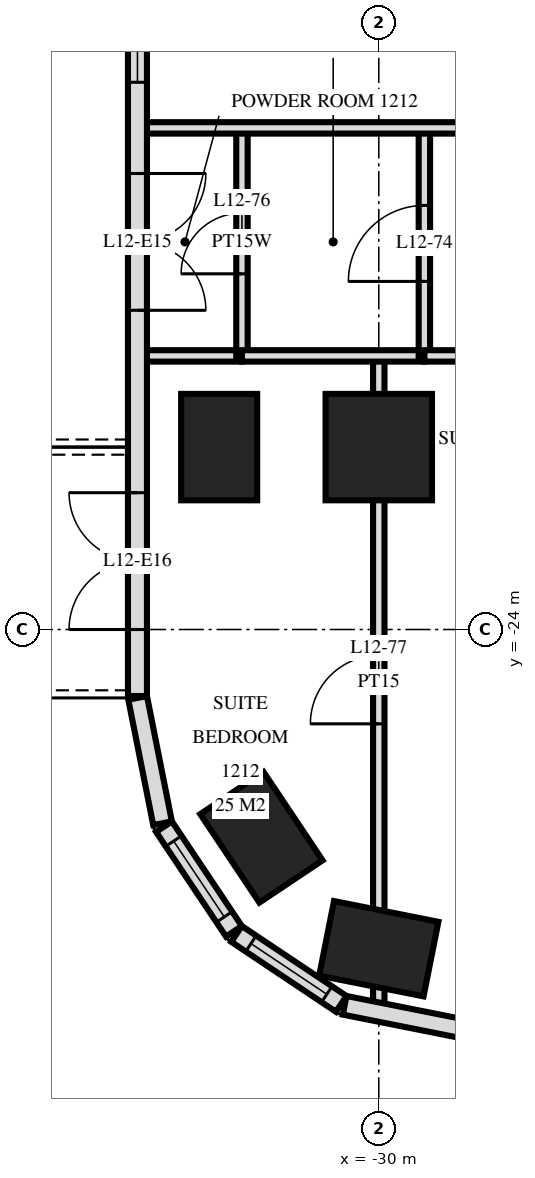
"""IFC4 building model, lengths in metres.
Left out: names, types, materials, properties, quantities, classifications, styles, units other than length and angle.
Written with IfcOpenShell. Run it as: python <this file> out.ifc"""

import sys

from ifc_helpers import new_model, si_unit, direction, frame, frame_2d, origin, origin_2d, place, context, subcontext, project, spatial, rectangle, extrude, element, fill, save


model = new_model("IFC4")
c1 = context("Model", 3, precision=1e-05, world=origin(), true_north=direction((0.0, 1.0)))
c2 = subcontext(c1, "Body", "Model", "MODEL_VIEW")
j1 = project(units=[si_unit("LENGTHUNIT", "METRE"), si_unit("PLANEANGLEUNIT", "RADIAN")], contexts=[c1])
p1 = place(None, origin())
s1 = spatial("IfcSite", under=j1, at=p1, CompositionType="ELEMENT")
p2 = place(p1, origin())
s2 = spatial("IfcBuilding", under=s1, at=p2, CompositionType="ELEMENT")
p3 = place(p2, frame((0.0, 0.0, 52.8)))
s3 = spatial("IfcBuildingStorey", under=s2, at=p3, CompositionType="ELEMENT", Elevation=52.8)
for number, where, z_axis, x_axis in (
    (1, (-32.1, -21.6, 0.0), (0.0, 0.0, 1.0), (0.0, 1.0, 0.0)),
    (2, (-31.544, -26.733, 0.0), (0.0, 0.0, 1.0), (-0.556, 0.831, 0.0)),
    (3, (-30.0, -28.2, 0.0), (0.0, 0.0, 1.0), (-0.981, 0.195, 0.0)),
):
    element("IfcColumn", number, at=place(p3, frame(where, z_axis=z_axis, x_axis=x_axis)), inside=s3, PredefinedType="COLUMN", context=c2, shape_type="SweptSolid", body=[
        extrude(rectangle(XDim=1.4, YDim=1.0, at=origin_2d()), origin(), (0.0, 0.0, 1.0), 3.6),
    ])
p4 = place(p3, frame((-30.0, -21.6, 0.0), z_axis=(0.0, 0.0, 1.0), x_axis=(1.0, 0.0, 0.0)))
e4 = element("IfcColumn", 4, at=p4, inside=s3, PredefinedType="COLUMN", context=c2, shape_type="SweptSolid", body=[
    extrude(rectangle(XDim=1.4, YDim=1.4, at=origin_2d()), origin(), (0.0, 0.0, 1.0), 3.6),
])
p5 = place(p3, frame((-33.175, -3.325, 0.0), z_axis=(0.0, 0.0, 1.0), x_axis=(0.0, -1.0, 0.0)))
e5 = element("IfcWall", 5, at=p5, inside=s3, PredefinedType="SOLIDWALL", context=c2, shape_type="SweptSolid", body=[
    extrude(rectangle(XDim=21.551, YDim=0.25, at=frame_2d((10.775, 0.0))), origin(), (0.0, 0.0, 1.0), 3.32),
])
p6 = place(p5, frame((6.65, 0.0, 0.0)))
e6 = element("IfcOpeningElement", 6, at=p6, cuts=e5, PredefinedType="OPENING", context=c2, shape_type="SweptSolid", body=[
    extrude(rectangle(XDim=1.8, YDim=2.4, at=frame_2d((0.9, 1.2))), frame((0.0, 0.135, 0.0), z_axis=(0.0, -1.0, 0.0), x_axis=(1.0, 0.0, 0.0)), (0.0, 0.0, 1.0), 0.27),
])
p7 = place(p5, frame((12.275, 0.0, 0.3)))
e7 = element("IfcOpeningElement", 7, at=p7, cuts=e5, PredefinedType="OPENING", context=c2, shape_type="SweptSolid", body=[
    extrude(rectangle(XDim=1.2, YDim=2.1, at=frame_2d((0.6, 1.05))), frame((0.0, 0.135, 0.0), z_axis=(0.0, -1.0, 0.0), x_axis=(1.0, 0.0, 0.0)), (0.0, 0.0, 1.0), 0.27),
])
p8 = place(p5, frame((14.675, 0.0, 0.0)))
e8 = element("IfcOpeningElement", 8, at=p8, cuts=e5, PredefinedType="OPENING", context=c2, shape_type="SweptSolid", body=[
    extrude(rectangle(XDim=1.8, YDim=2.4, at=frame_2d((0.9, 1.2))), frame((0.0, 0.135, 0.0), z_axis=(0.0, -1.0, 0.0), x_axis=(1.0, 0.0, 0.0)), (0.0, 0.0, 1.0), 0.27),
])
p9 = place(p5, frame((18.875, 0.0, 0.0)))
e9 = element("IfcOpeningElement", 9, at=p9, cuts=e5, PredefinedType="OPENING", context=c2, shape_type="SweptSolid", body=[
    extrude(rectangle(XDim=1.8, YDim=2.4, at=frame_2d((0.9, 1.2))), frame((0.0, 0.135, 0.0), z_axis=(0.0, -1.0, 0.0), x_axis=(1.0, 0.0, 0.0)), (0.0, 0.0, 1.0), 0.27),
])
p10 = place(p3, frame((-33.173, -24.9, 0.0), z_axis=(0.0, 0.0, 1.0), x_axis=(0.195166572128, -0.980770110232, 0.0)))
e10 = element("IfcWall", 10, at=p10, inside=s3, PredefinedType="SOLIDWALL", context=c2, shape_type="SweptSolid", body=[
    extrude(rectangle(XDim=1.681, YDim=0.25, at=frame_2d((0.841, 0.0))), origin(), (0.0, 0.0, 1.0), 3.32),
])
p11 = place(p3, frame((-32.826, -26.594, 0.0), z_axis=(0.0, 0.0, 1.0), x_axis=(0.55555029066, -0.831482937015, 0.0)))
e11 = element("IfcWall", 11, at=p11, inside=s3, PredefinedType="SOLIDWALL", context=c2, shape_type="SweptSolid", body=[
    extrude(rectangle(XDim=1.656, YDim=0.25, at=frame_2d((0.828, 0.0))), origin(), (0.0, 0.0, 1.0), 3.32),
])
p12 = place(p11, frame((0.228, 0.0, 0.9)))
e12 = element("IfcOpeningElement", 12, at=p12, cuts=e11, PredefinedType="OPENING", context=c2, shape_type="SweptSolid", body=[
    extrude(rectangle(XDim=1.2, YDim=1.5, at=frame_2d((0.6, 0.75))), frame((0.0, 0.135, 0.0), z_axis=(0.0, -1.0, 0.0), x_axis=(1.0, 0.0, 0.0)), (0.0, 0.0, 1.0), 0.27),
])
p13 = place(p3, frame((-31.871, -28.006, 0.0), z_axis=(0.0, 0.0, 1.0), x_axis=(0.831482937015, -0.55555029066, 0.0)))
e13 = element("IfcWall", 13, at=p13, inside=s3, PredefinedType="SOLIDWALL", context=c2, shape_type="SweptSolid", body=[
    extrude(rectangle(XDim=1.656, YDim=0.25, at=frame_2d((0.828, 0.0))), origin(), (0.0, 0.0, 1.0), 3.32),
])
p14 = place(p13, frame((0.228, 0.0, 0.9)))
e14 = element("IfcOpeningElement", 14, at=p14, cuts=e13, PredefinedType="OPENING", context=c2, shape_type="SweptSolid", body=[
    extrude(rectangle(XDim=1.2, YDim=1.5, at=frame_2d((0.6, 0.75))), frame((0.0, 0.135, 0.0), z_axis=(0.0, -1.0, 0.0), x_axis=(1.0, 0.0, 0.0)), (0.0, 0.0, 1.0), 0.27),
])
p15 = place(p3, frame((-30.449, -28.945, 0.0), z_axis=(0.0, 0.0, 1.0), x_axis=(0.980775640221, -0.19513878023, 0.0)))
e15 = element("IfcWall", 15, at=p15, inside=s3, PredefinedType="SOLIDWALL", context=c2, shape_type="SweptSolid", body=[
    extrude(rectangle(XDim=1.681, YDim=0.25, at=frame_2d((0.841, 0.0))), origin(), (0.0, 0.0, 1.0), 3.32),
])
p16 = place(p3, frame((-29.4, -20.4, 0.0), z_axis=(0.0, 0.0, 1.0), x_axis=(0.0, 1.0, 0.0)))
e16 = element("IfcWall", 16, at=p16, inside=s3, PredefinedType="PARTITIONING", context=c2, shape_type="SweptSolid", body=[
    extrude(rectangle(XDim=3.0, YDim=0.15, at=frame_2d((1.5, 0.0))), origin(), (0.0, 0.0, 1.0), 3.32),
])
p17 = place(p16, frame((0.98, 0.0, 0.0)))
e17 = element("IfcOpeningElement", 17, at=p17, cuts=e16, PredefinedType="OPENING", context=c2, shape_type="SweptSolid", body=[
    extrude(rectangle(XDim=1.0, YDim=2.1, at=frame_2d((0.5, 1.05))), frame((0.0, 0.085, 0.0), z_axis=(0.0, -1.0, 0.0), x_axis=(1.0, 0.0, 0.0)), (0.0, 0.0, 1.0), 0.17),
])
p18 = place(p3, frame((-30.0, -28.978, 0.0), z_axis=(0.0, 0.0, 1.0), x_axis=(0.0, 1.0, 0.0)))
e18 = element("IfcWall", 18, at=p18, inside=s3, PredefinedType="PARTITIONING", context=c2, shape_type="SweptSolid", body=[
    extrude(rectangle(XDim=8.578, YDim=0.15, at=frame_2d((4.289, 0.0))), origin(), (0.0, 0.0, 1.0), 3.32),
])
p19 = place(p18, frame((3.737, 0.0, 0.0)))
e19 = element("IfcOpeningElement", 19, at=p19, cuts=e18, PredefinedType="OPENING", context=c2, shape_type="SweptSolid", body=[
    extrude(rectangle(XDim=0.9, YDim=2.1, at=frame_2d((0.45, 1.05))), frame((0.0, 0.085, 0.0), z_axis=(0.0, -1.0, 0.0), x_axis=(1.0, 0.0, 0.0)), (0.0, 0.0, 1.0), 0.17),
])
p20 = place(p3, frame((-31.8, -20.4, 0.0), z_axis=(0.0, 0.0, 1.0), x_axis=(0.0, 1.0, 0.0)))
e20 = element("IfcWall", 20, at=p20, inside=s3, PredefinedType="PLUMBINGWALL", context=c2, shape_type="SweptSolid", body=[
    extrude(rectangle(XDim=3.0, YDim=0.15, at=frame_2d((1.5, 0.0))), origin(), (0.0, 0.0, 1.0), 3.32),
])
p21 = place(p20, frame((1.08, 0.0, 0.0)))
e21 = element("IfcOpeningElement", 21, at=p21, cuts=e20, PredefinedType="OPENING", context=c2, shape_type="SweptSolid", body=[
    extrude(rectangle(XDim=0.8, YDim=2.1, at=frame_2d((0.4, 1.05))), frame((0.0, 0.085, 0.0), z_axis=(0.0, -1.0, 0.0), x_axis=(1.0, 0.0, 0.0)), (0.0, 0.0, 1.0), 0.17),
])
p22 = place(p3, frame((-29.4, -20.4, 0.0), z_axis=(0.0, 0.0, 1.0), x_axis=(1.0, 0.0, 0.0)))
e22 = element("IfcWall", 22, at=p22, inside=s3, PredefinedType="PARTITIONING", context=c2, shape_type="SweptSolid", body=[
    extrude(rectangle(XDim=2.4, YDim=0.15, at=frame_2d((1.2, 0.0))), origin(), (0.0, 0.0, 1.0), 3.32),
])
p23 = place(p22, frame((0.68, 0.0, 0.0)))
e23 = element("IfcOpeningElement", 23, at=p23, cuts=e22, PredefinedType="OPENING", context=c2, shape_type="SweptSolid", body=[
    extrude(rectangle(XDim=1.0, YDim=2.1, at=frame_2d((0.5, 1.05))), frame((0.0, 0.085, 0.0), z_axis=(0.0, -1.0, 0.0), x_axis=(1.0, 0.0, 0.0)), (0.0, 0.0, 1.0), 0.17),
])
p24 = place(p3, frame((-31.8, -20.4, 0.0), z_axis=(0.0, 0.0, 1.0), x_axis=(1.0, 0.0, 0.0)))
e24 = element("IfcWall", 24, at=p24, inside=s3, PredefinedType="PARTITIONING", context=c2, shape_type="SweptSolid", body=[
    extrude(rectangle(XDim=2.4, YDim=0.15, at=frame_2d((1.2, 0.0))), origin(), (0.0, 0.0, 1.0), 3.32),
])
p25 = place(p3, frame((-33.12, -20.4, 0.0), z_axis=(0.0, 0.0, 1.0), x_axis=(1.0, 0.0, 0.0)))
e25 = element("IfcWall", 25, at=p25, inside=s3, PredefinedType="PLUMBINGWALL", context=c2, shape_type="SweptSolid", body=[
    extrude(rectangle(XDim=1.32, YDim=0.15, at=frame_2d((0.66, 0.0))), origin(), (0.0, 0.0, 1.0), 3.32),
])
p26 = place(p3, frame((-33.12, -17.4, 0.0), z_axis=(0.0, 0.0, 1.0), x_axis=(1.0, 0.0, 0.0)))
e26 = element("IfcWall", 26, at=p26, inside=s3, PredefinedType="PARTITIONING", context=c2, shape_type="SweptSolid", body=[
    extrude(rectangle(XDim=66.24, YDim=0.15, at=frame_2d((33.12, 0.0))), origin(), (0.0, 0.0, 1.0), 3.32),
])
p27 = place(p26, frame((9.27, 0.0, 0.0)))
e27 = element("IfcOpeningElement", 27, at=p27, cuts=e26, PredefinedType="OPENING", context=c2, shape_type="SweptSolid", body=[
    extrude(rectangle(XDim=1.0, YDim=2.1, at=frame_2d((0.5, 1.05))), frame((0.0, 0.085, 0.0), z_axis=(0.0, -1.0, 0.0), x_axis=(1.0, 0.0, 0.0)), (0.0, 0.0, 1.0), 0.17),
])
p28 = place(p26, frame((13.97, 0.0, 0.0)))
e28 = element("IfcOpeningElement", 28, at=p28, cuts=e26, PredefinedType="OPENING", context=c2, shape_type="SweptSolid", body=[
    extrude(rectangle(XDim=1.0, YDim=2.1, at=frame_2d((0.5, 1.05))), frame((0.0, 0.085, 0.0), z_axis=(0.0, -1.0, 0.0), x_axis=(1.0, 0.0, 0.0)), (0.0, 0.0, 1.0), 0.17),
])
p29 = place(p26, frame((15.27, 0.0, 0.0)))
e29 = element("IfcOpeningElement", 29, at=p29, cuts=e26, PredefinedType="OPENING", context=c2, shape_type="SweptSolid", body=[
    extrude(rectangle(XDim=1.0, YDim=2.1, at=frame_2d((0.5, 1.05))), frame((0.0, 0.085, 0.0), z_axis=(0.0, -1.0, 0.0), x_axis=(1.0, 0.0, 0.0)), (0.0, 0.0, 1.0), 0.17),
])
p30 = place(p26, frame((19.97, 0.0, 0.0)))
e30 = element("IfcOpeningElement", 30, at=p30, cuts=e26, PredefinedType="OPENING", context=c2, shape_type="SweptSolid", body=[
    extrude(rectangle(XDim=1.0, YDim=2.1, at=frame_2d((0.5, 1.05))), frame((0.0, 0.085, 0.0), z_axis=(0.0, -1.0, 0.0), x_axis=(1.0, 0.0, 0.0)), (0.0, 0.0, 1.0), 0.17),
])
p31 = place(p26, frame((22.27, 0.0, 0.0)))
e31 = element("IfcOpeningElement", 31, at=p31, cuts=e26, PredefinedType="OPENING", context=c2, shape_type="SweptSolid", body=[
    extrude(rectangle(XDim=1.0, YDim=2.1, at=frame_2d((0.5, 1.05))), frame((0.0, 0.085, 0.0), z_axis=(0.0, -1.0, 0.0), x_axis=(1.0, 0.0, 0.0)), (0.0, 0.0, 1.0), 0.17),
])
p32 = place(p26, frame((28.97, 0.0, 0.0)))
e32 = element("IfcOpeningElement", 32, at=p32, cuts=e26, PredefinedType="OPENING", context=c2, shape_type="SweptSolid", body=[
    extrude(rectangle(XDim=1.0, YDim=2.1, at=frame_2d((0.5, 1.05))), frame((0.0, 0.085, 0.0), z_axis=(0.0, -1.0, 0.0), x_axis=(1.0, 0.0, 0.0)), (0.0, 0.0, 1.0), 0.17),
])
p33 = place(p26, frame((30.27, 0.0, 0.0)))
e33 = element("IfcOpeningElement", 33, at=p33, cuts=e26, PredefinedType="OPENING", context=c2, shape_type="SweptSolid", body=[
    extrude(rectangle(XDim=1.0, YDim=2.1, at=frame_2d((0.5, 1.05))), frame((0.0, 0.085, 0.0), z_axis=(0.0, -1.0, 0.0), x_axis=(1.0, 0.0, 0.0)), (0.0, 0.0, 1.0), 0.17),
])
p34 = place(p26, frame((34.97, 0.0, 0.0)))
e34 = element("IfcOpeningElement", 34, at=p34, cuts=e26, PredefinedType="OPENING", context=c2, shape_type="SweptSolid", body=[
    extrude(rectangle(XDim=1.0, YDim=2.1, at=frame_2d((0.5, 1.05))), frame((0.0, 0.085, 0.0), z_axis=(0.0, -1.0, 0.0), x_axis=(1.0, 0.0, 0.0)), (0.0, 0.0, 1.0), 0.17),
])
p35 = place(p26, frame((36.27, 0.0, 0.0)))
e35 = element("IfcOpeningElement", 35, at=p35, cuts=e26, PredefinedType="OPENING", context=c2, shape_type="SweptSolid", body=[
    extrude(rectangle(XDim=1.0, YDim=2.1, at=frame_2d((0.5, 1.05))), frame((0.0, 0.085, 0.0), z_axis=(0.0, -1.0, 0.0), x_axis=(1.0, 0.0, 0.0)), (0.0, 0.0, 1.0), 0.17),
])
p36 = place(p26, frame((39.82, 0.0, 0.0)))
e36 = element("IfcOpeningElement", 36, at=p36, cuts=e26, PredefinedType="OPENING", context=c2, shape_type="SweptSolid", body=[
    extrude(rectangle(XDim=1.0, YDim=2.1, at=frame_2d((0.5, 1.05))), frame((0.0, 0.085, 0.0), z_axis=(0.0, -1.0, 0.0), x_axis=(1.0, 0.0, 0.0)), (0.0, 0.0, 1.0), 0.17),
])
p37 = place(p26, frame((51.27, 0.0, 0.0)))
e37 = element("IfcOpeningElement", 37, at=p37, cuts=e26, PredefinedType="OPENING", context=c2, shape_type="SweptSolid", body=[
    extrude(rectangle(XDim=1.0, YDim=2.1, at=frame_2d((0.5, 1.05))), frame((0.0, 0.085, 0.0), z_axis=(0.0, -1.0, 0.0), x_axis=(1.0, 0.0, 0.0)), (0.0, 0.0, 1.0), 0.17),
])
p38 = place(p26, frame((4.42, 0.0, 0.0)))
e38 = element("IfcOpeningElement", 38, at=p38, cuts=e26, PredefinedType="OPENING", context=c2, shape_type="SweptSolid", body=[
    extrude(rectangle(XDim=1.0, YDim=2.1, at=frame_2d((0.5, 1.05))), frame((0.0, 0.085, 0.0), z_axis=(0.0, -1.0, 0.0), x_axis=(1.0, 0.0, 0.0)), (0.0, 0.0, 1.0), 0.17),
])
p39 = place(p26, frame((54.82, 0.0, 0.0)))
e39 = element("IfcOpeningElement", 39, at=p39, cuts=e26, PredefinedType="OPENING", context=c2, shape_type="SweptSolid", body=[
    extrude(rectangle(XDim=1.0, YDim=2.1, at=frame_2d((0.5, 1.05))), frame((0.0, 0.085, 0.0), z_axis=(0.0, -1.0, 0.0), x_axis=(1.0, 0.0, 0.0)), (0.0, 0.0, 1.0), 0.17),
])
p40 = place(p12, origin())
e40 = element("IfcWindow", 40, at=p40, inside=s3, PartitioningType="SINGLE_PANEL", PredefinedType="WINDOW", context=c2, shape_type="SweptSolid", body=[
    extrude(rectangle(XDim=1.2, YDim=1.5, at=frame_2d((0.6, 0.75))), frame((0.0, 0.03, 0.0), z_axis=(0.0, -1.0, 0.0), x_axis=(1.0, 0.0, 0.0)), (0.0, 0.0, 1.0), 0.06),
])
fill(e12, e40)
p41 = place(p14, origin())
e41 = element("IfcWindow", 41, at=p41, inside=s3, PartitioningType="SINGLE_PANEL", PredefinedType="WINDOW", context=c2, shape_type="SweptSolid", body=[
    extrude(rectangle(XDim=1.2, YDim=1.5, at=frame_2d((0.6, 0.75))), frame((0.0, 0.03, 0.0), z_axis=(0.0, -1.0, 0.0), x_axis=(1.0, 0.0, 0.0)), (0.0, 0.0, 1.0), 0.06),
])
fill(e14, e41)
p42 = place(p7, origin())
e42 = element("IfcWindow", 42, at=p42, inside=s3, PartitioningType="SINGLE_PANEL", PredefinedType="WINDOW", context=c2, shape_type="SweptSolid", body=[
    extrude(rectangle(XDim=1.2, YDim=2.1, at=frame_2d((0.6, 1.05))), frame((0.0, 0.03, 0.0), z_axis=(0.0, -1.0, 0.0), x_axis=(1.0, 0.0, 0.0)), (0.0, 0.0, 1.0), 0.06),
])
fill(e7, e42)
p43 = place(p8, origin())
e43 = element("IfcDoor", 43, at=p43, inside=s3, OperationType="DOUBLE_DOOR_SINGLE_SWING", PredefinedType="DOOR", context=c2, shape_type="SweptSolid", body=[
    extrude(rectangle(XDim=1.8, YDim=2.4, at=frame_2d((0.9, 1.2))), frame((0.0, 0.025, 0.0), z_axis=(0.0, -1.0, 0.0), x_axis=(1.0, 0.0, 0.0)), (0.0, 0.0, 1.0), 0.05),
])
fill(e8, e43)
p44 = place(p9, frame((0.9, 0.0, 0.0), z_axis=(0.0, 0.0, 1.0), x_axis=(-1.0, 0.0, 0.0)))
e44 = element("IfcDoor", 44, at=p44, inside=s3, OperationType="DOUBLE_DOOR_SINGLE_SWING", PredefinedType="DOOR", context=c2, shape_type="SweptSolid", body=[
    extrude(rectangle(XDim=1.8, YDim=2.4, at=frame_2d((0.0, 1.2))), frame((0.0, -0.025, 0.0), z_axis=(0.0, 1.0, 0.0), x_axis=(-1.0, 0.0, 0.0)), (0.0, 0.0, 1.0), 0.05),
])
fill(e9, e44)
p45 = place(p17, origin())
e45 = element("IfcDoor", 45, at=p45, inside=s3, OperationType="SINGLE_SWING_RIGHT", PredefinedType="DOOR", context=c2, shape_type="SweptSolid", body=[
    extrude(rectangle(XDim=1.0, YDim=2.1, at=frame_2d((0.5, 1.05))), frame((0.0, 0.025, 0.0), z_axis=(0.0, -1.0, 0.0), x_axis=(1.0, 0.0, 0.0)), (0.0, 0.0, 1.0), 0.05),
])
fill(e17, e45)
p46 = place(p21, origin())
e46 = element("IfcDoor", 46, at=p46, inside=s3, OperationType="SINGLE_SWING_RIGHT", PredefinedType="DOOR", context=c2, shape_type="SweptSolid", body=[
    extrude(rectangle(XDim=0.8, YDim=2.1, at=frame_2d((0.4, 1.05))), frame((0.0, 0.025, 0.0), z_axis=(0.0, -1.0, 0.0), x_axis=(1.0, 0.0, 0.0)), (0.0, 0.0, 1.0), 0.05),
])
fill(e21, e46)
p47 = place(p19, origin())
e47 = element("IfcDoor", 47, at=p47, inside=s3, OperationType="SINGLE_SWING_RIGHT", PredefinedType="DOOR", context=c2, shape_type="SweptSolid", body=[
    extrude(rectangle(XDim=0.9, YDim=2.1, at=frame_2d((0.45, 1.05))), frame((0.0, 0.025, 0.0), z_axis=(0.0, -1.0, 0.0), x_axis=(1.0, 0.0, 0.0)), (0.0, 0.0, 1.0), 0.05),
])
fill(e19, e47)
save(model, sys.argv[1])
